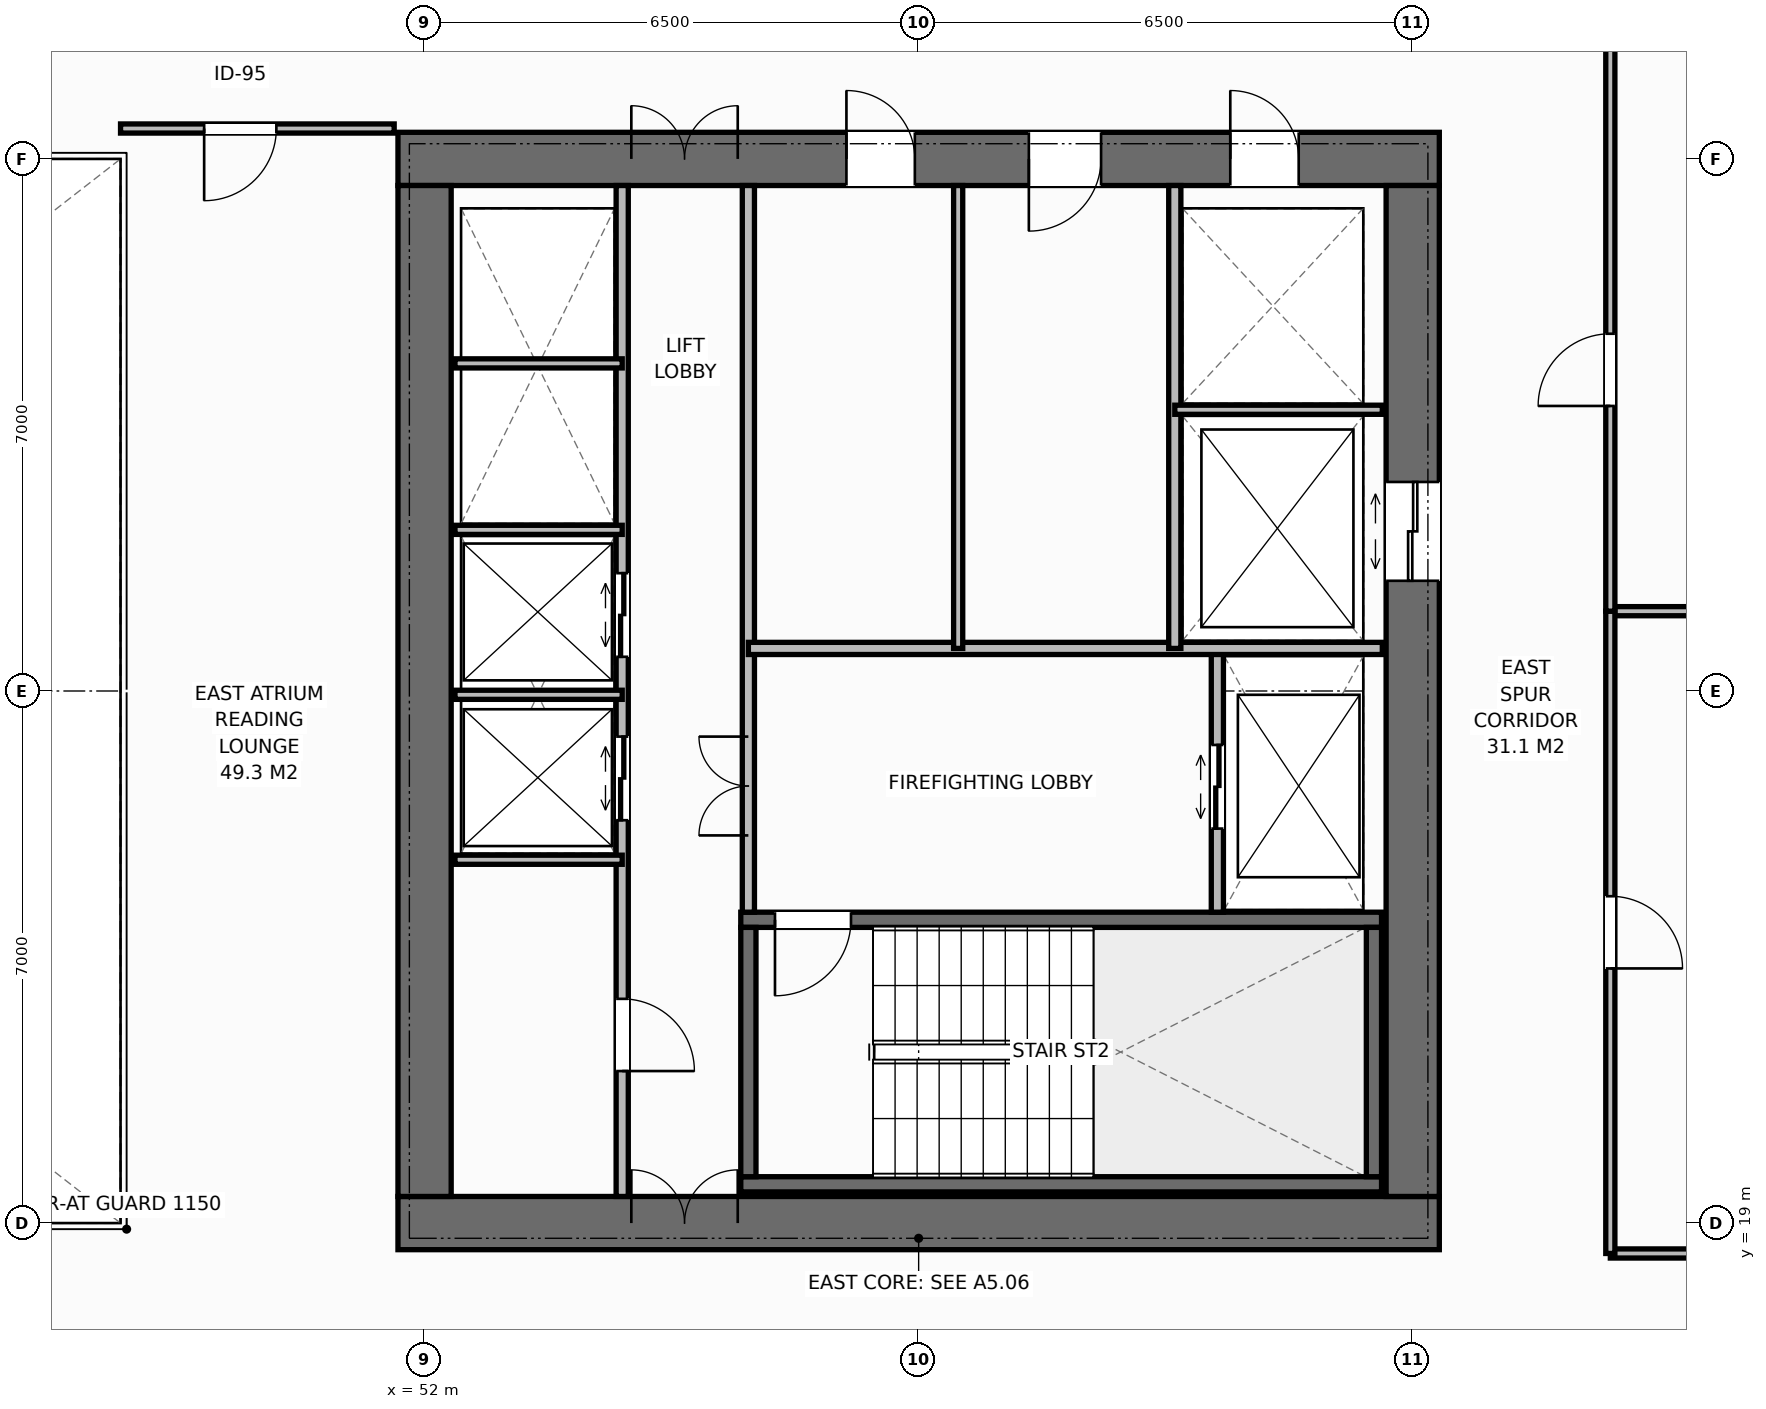
"""IFC4 building model, lengths in metres.
Left out: names, types, materials, properties, quantities, classifications, styles, units other than length and angle.
Written with IfcOpenShell. Run it as: python <this file> out.ifc"""

import sys

from ifc_helpers import new_model, si_unit, direction, frame, frame_2d, origin, place, context, subcontext, project, spatial, rectangle, extrude, element, fill, save


model = new_model("IFC4")
c1 = context("Model", 3, precision=1e-05, world=origin(), true_north=direction((0.0, 1.0)))
c2 = subcontext(c1, "Body", "Model", "MODEL_VIEW")
j1 = project(units=[si_unit("LENGTHUNIT", "METRE"), si_unit("PLANEANGLEUNIT", "RADIAN")], contexts=[c1])
p1 = place(None, origin())
s1 = spatial("IfcSite", under=j1, at=p1, CompositionType="ELEMENT")
p2 = place(p1, origin())
s2 = spatial("IfcBuilding", under=s1, at=p2, CompositionType="ELEMENT")
p3 = place(p2, frame((0.0, 0.0, 131.6)))
s3 = spatial("IfcBuildingStorey", under=s2, at=p3, CompositionType="ELEMENT", Elevation=131.6)
p4 = place(p3, frame((51.65, 19.0, 0.0), z_axis=(0.0, 0.0, 1.0), x_axis=(1.0, 0.0, 0.0)))
e1 = element("IfcWall", 1, at=p4, inside=s3, PredefinedType="SHEAR", context=c2, shape_type="SweptSolid", body=[
    extrude(rectangle(XDim=13.7, YDim=0.7, at=frame_2d((6.85, 0.0))), origin(), (0.0, 0.0, 1.0), 3.8),
])
p5 = place(p4, frame((3.07, 0.0, 0.0)))
e2 = element("IfcOpeningElement", 2, at=p5, cuts=e1, PredefinedType="OPENING", context=c2, shape_type="SweptSolid", body=[
    extrude(rectangle(XDim=1.4, YDim=2.2, at=frame_2d((0.7, 1.1))), frame((0.0, 0.36, 0.0), z_axis=(0.0, -1.0, 0.0), x_axis=(1.0, 0.0, 0.0)), (0.0, 0.0, 1.0), 0.72),
])
p6 = place(p3, frame((51.65, 33.0, 0.0), z_axis=(0.0, 0.0, 1.0), x_axis=(1.0, 0.0, 0.0)))
e3 = element("IfcWall", 3, at=p6, inside=s3, PredefinedType="SHEAR", context=c2, shape_type="SweptSolid", body=[
    extrude(rectangle(XDim=13.7, YDim=0.7, at=frame_2d((6.85, 0.0))), origin(), (0.0, 0.0, 1.0), 3.8),
])
p7 = place(p6, frame((3.07, 0.0, 0.0)))
e4 = element("IfcOpeningElement", 4, at=p7, cuts=e3, PredefinedType="OPENING", context=c2, shape_type="SweptSolid", body=[
    extrude(rectangle(XDim=1.4, YDim=2.2, at=frame_2d((0.7, 1.1))), frame((0.0, 0.36, 0.0), z_axis=(0.0, -1.0, 0.0), x_axis=(1.0, 0.0, 0.0)), (0.0, 0.0, 1.0), 0.72),
])
p8 = place(p6, frame((10.95, 0.0, 0.0)))
e5 = element("IfcOpeningElement", 5, at=p8, cuts=e3, PredefinedType="OPENING", context=c2, shape_type="SweptSolid", body=[
    extrude(rectangle(XDim=0.9, YDim=2.15, at=frame_2d((0.45, 1.075))), frame((0.0, 0.36, 0.0), z_axis=(0.0, -1.0, 0.0), x_axis=(1.0, 0.0, 0.0)), (0.0, 0.0, 1.0), 0.72),
])
p9 = place(p6, frame((5.9, 0.0, 0.0)))
e6 = element("IfcOpeningElement", 6, at=p9, cuts=e3, PredefinedType="OPENING", context=c2, shape_type="SweptSolid", body=[
    extrude(rectangle(XDim=0.9, YDim=2.15, at=frame_2d((0.45, 1.075))), frame((0.0, 0.36, 0.0), z_axis=(0.0, -1.0, 0.0), x_axis=(1.0, 0.0, 0.0)), (0.0, 0.0, 1.0), 0.72),
])
p10 = place(p6, frame((8.3, 0.0, 0.0)))
e7 = element("IfcOpeningElement", 7, at=p10, cuts=e3, PredefinedType="OPENING", context=c2, shape_type="SweptSolid", body=[
    extrude(rectangle(XDim=0.95, YDim=2.15, at=frame_2d((0.475, 1.075))), frame((0.0, 0.36, 0.0), z_axis=(0.0, -1.0, 0.0), x_axis=(1.0, 0.0, 0.0)), (0.0, 0.0, 1.0), 0.72),
])
p11 = place(p3, frame((52.0, 19.35, 0.0), z_axis=(0.0, 0.0, 1.0), x_axis=(0.0, 1.0, 0.0)))
e8 = element("IfcWall", 8, at=p11, inside=s3, PredefinedType="SHEAR", context=c2, shape_type="SweptSolid", body=[
    extrude(rectangle(XDim=13.3, YDim=0.7, at=frame_2d((6.65, 0.0))), origin(), (0.0, 0.0, 1.0), 3.8),
])
p12 = place(p3, frame((65.0, 19.35, 0.0), z_axis=(0.0, 0.0, 1.0), x_axis=(0.0, 1.0, 0.0)))
e9 = element("IfcWall", 9, at=p12, inside=s3, PredefinedType="SHEAR", context=c2, shape_type="SweptSolid", body=[
    extrude(rectangle(XDim=13.3, YDim=0.7, at=frame_2d((6.65, 0.0))), origin(), (0.0, 0.0, 1.0), 3.8),
])
p13 = place(p12, frame((8.1, 0.0, 0.0)))
e10 = element("IfcOpeningElement", 10, at=p13, cuts=e9, PredefinedType="OPENING", context=c2, shape_type="SweptSolid", body=[
    extrude(rectangle(XDim=1.3, YDim=2.2, at=frame_2d((0.65, 1.1))), frame((0.0, 0.36, 0.0), z_axis=(0.0, -1.0, 0.0), x_axis=(1.0, 0.0, 0.0)), (0.0, 0.0, 1.0), 0.72),
])
p14 = place(p3, frame((56.16, 19.51, 0.0), z_axis=(0.0, 0.0, 1.0), x_axis=(1.0, 0.0, 0.0)))
e11 = element("IfcWall", 11, at=p14, inside=s3, PredefinedType="SHEAR", context=c2, shape_type="SweptSolid", body=[
    extrude(rectangle(XDim=8.43, YDim=0.2, at=frame_2d((4.215, 0.0))), origin(), (0.0, 0.0, 1.0), 3.8),
])
p15 = place(p3, frame((56.16, 22.99, 0.0), z_axis=(0.0, 0.0, 1.0), x_axis=(1.0, 0.0, 0.0)))
e12 = element("IfcWall", 12, at=p15, inside=s3, PredefinedType="SHEAR", context=c2, shape_type="SweptSolid", body=[
    extrude(rectangle(XDim=8.43, YDim=0.2, at=frame_2d((4.215, 0.0))), origin(), (0.0, 0.0, 1.0), 3.8),
])
p16 = place(p15, frame((0.45, 0.0, 0.0)))
e13 = element("IfcOpeningElement", 13, at=p16, cuts=e12, PredefinedType="OPENING", context=c2, shape_type="SweptSolid", body=[
    extrude(rectangle(XDim=1.0, YDim=2.15, at=frame_2d((0.5, 1.075))), frame((0.0, 0.11, 0.0), z_axis=(0.0, -1.0, 0.0), x_axis=(1.0, 0.0, 0.0)), (0.0, 0.0, 1.0), 0.22),
])
for number, where, z_axis, x_axis in (
    (14, (56.26, 19.61, 0.0), (0.0, 0.0, 1.0), (0.0, 1.0, 0.0)),
    (15, (64.49, 19.61, 0.0), (0.0, 0.0, 1.0), (0.0, 1.0, 0.0)),
):
    element("IfcWall", number, at=place(p3, frame(where, z_axis=z_axis, x_axis=x_axis)), inside=s3, PredefinedType="SHEAR", context=c2, shape_type="SweptSolid", body=[
        extrude(rectangle(XDim=3.28, YDim=0.2, at=frame_2d((1.64, 0.0))), origin(), (0.0, 0.0, 1.0), 3.8),
    ])
p17 = place(p3, frame((54.6, 19.35, 0.0), z_axis=(0.0, 0.0, 1.0), x_axis=(0.0, 1.0, 0.0)))
e16 = element("IfcWall", 16, at=p17, inside=s3, PredefinedType="STANDARD", context=c2, shape_type="SweptSolid", body=[
    extrude(rectangle(XDim=13.3, YDim=0.16, at=frame_2d((6.65, 0.0))), origin(), (0.0, 0.0, 1.0), 3.565),
])
p18 = place(p17, frame((1.65, 0.0, 0.0)))
e17 = element("IfcOpeningElement", 17, at=p18, cuts=e16, PredefinedType="OPENING", context=c2, shape_type="SweptSolid", body=[
    extrude(rectangle(XDim=0.95, YDim=2.15, at=frame_2d((0.475, 1.075))), frame((0.0, 0.09, 0.0), z_axis=(0.0, -1.0, 0.0), x_axis=(1.0, 0.0, 0.0)), (0.0, 0.0, 1.0), 0.18),
])
p19 = place(p17, frame((4.95, 0.0, 0.0)))
e18 = element("IfcOpeningElement", 18, at=p19, cuts=e16, PredefinedType="OPENING", context=c2, shape_type="SweptSolid", body=[
    extrude(rectangle(XDim=1.1, YDim=2.2, at=frame_2d((0.55, 1.1))), frame((0.0, 0.09, 0.0), z_axis=(0.0, -1.0, 0.0), x_axis=(1.0, 0.0, 0.0)), (0.0, 0.0, 1.0), 0.18),
])
p20 = place(p17, frame((7.1, 0.0, 0.0)))
e19 = element("IfcOpeningElement", 19, at=p20, cuts=e16, PredefinedType="OPENING", context=c2, shape_type="SweptSolid", body=[
    extrude(rectangle(XDim=1.1, YDim=2.2, at=frame_2d((0.55, 1.1))), frame((0.0, 0.09, 0.0), z_axis=(0.0, -1.0, 0.0), x_axis=(1.0, 0.0, 0.0)), (0.0, 0.0, 1.0), 0.18),
])
p21 = place(p3, frame((56.26, 23.09, 0.0), z_axis=(0.0, 0.0, 1.0), x_axis=(0.0, 1.0, 0.0)))
e20 = element("IfcWall", 20, at=p21, inside=s3, PredefinedType="STANDARD", context=c2, shape_type="SweptSolid", body=[
    extrude(rectangle(XDim=9.56, YDim=0.16, at=frame_2d((4.78, 0.0))), origin(), (0.0, 0.0, 1.0), 3.565),
])
p22 = place(p21, frame((1.01, 0.0, 0.0)))
e21 = element("IfcOpeningElement", 21, at=p22, cuts=e20, PredefinedType="OPENING", context=c2, shape_type="SweptSolid", body=[
    extrude(rectangle(XDim=1.3, YDim=2.2, at=frame_2d((0.65, 1.1))), frame((0.0, 0.09, 0.0), z_axis=(0.0, -1.0, 0.0), x_axis=(1.0, 0.0, 0.0)), (0.0, 0.0, 1.0), 0.18),
])
for number, where, z_axis, x_axis in (
    (22, (52.4, 23.78, 0.0), (0.0, 0.0, 1.0), (1.0, 0.0, 0.0)),
    (23, (52.4, 25.95, 0.0), (0.0, 0.0, 1.0), (1.0, 0.0, 0.0)),
    (24, (52.4, 28.12, 0.0), (0.0, 0.0, 1.0), (1.0, 0.0, 0.0)),
    (25, (52.4, 30.31, 0.0), (0.0, 0.0, 1.0), (1.0, 0.0, 0.0)),
):
    element("IfcWall", number, at=place(p3, frame(where, z_axis=z_axis, x_axis=x_axis)), inside=s3, PredefinedType="PARTITIONING", context=c2, shape_type="SweptSolid", body=[
        extrude(rectangle(XDim=2.2, YDim=0.12, at=frame_2d((1.1, 0.0))), origin(), (0.0, 0.0, 1.0), 3.565),
    ])
p23 = place(p3, frame((62.43, 23.09, 0.0), z_axis=(0.0, 0.0, 1.0), x_axis=(0.0, 1.0, 0.0)))
e26 = element("IfcWall", 26, at=p23, inside=s3, PredefinedType="STANDARD", context=c2, shape_type="SweptSolid", body=[
    extrude(rectangle(XDim=3.47, YDim=0.16, at=frame_2d((1.735, 0.0))), origin(), (0.0, 0.0, 1.0), 3.565),
])
p24 = place(p23, frame((1.1, 0.0, 0.0)))
e27 = element("IfcOpeningElement", 27, at=p24, cuts=e26, PredefinedType="OPENING", context=c2, shape_type="SweptSolid", body=[
    extrude(rectangle(XDim=1.1, YDim=2.2, at=frame_2d((0.55, 1.1))), frame((0.0, 0.09, 0.0), z_axis=(0.0, -1.0, 0.0), x_axis=(1.0, 0.0, 0.0)), (0.0, 0.0, 1.0), 0.18),
])
p25 = place(p3, frame((56.26, 26.56, 0.0), z_axis=(0.0, 0.0, 1.0), x_axis=(1.0, 0.0, 0.0)))
e28 = element("IfcWall", 28, at=p25, inside=s3, PredefinedType="STANDARD", context=c2, shape_type="SweptSolid", body=[
    extrude(rectangle(XDim=8.34, YDim=0.16, at=frame_2d((4.17, 0.0))), origin(), (0.0, 0.0, 1.0), 3.565),
])
p26 = place(p3, frame((61.87, 26.56, 0.0), z_axis=(0.0, 0.0, 1.0), x_axis=(0.0, 1.0, 0.0)))
e29 = element("IfcWall", 29, at=p26, inside=s3, PredefinedType="STANDARD", context=c2, shape_type="SweptSolid", body=[
    extrude(rectangle(XDim=6.09, YDim=0.16, at=frame_2d((3.045, 0.0))), origin(), (0.0, 0.0, 1.0), 3.565),
])
p27 = place(p3, frame((61.87, 29.7, 0.0), z_axis=(0.0, 0.0, 1.0), x_axis=(1.0, 0.0, 0.0)))
e30 = element("IfcWall", 30, at=p27, inside=s3, PredefinedType="PARTITIONING", context=c2, shape_type="SweptSolid", body=[
    extrude(rectangle(XDim=2.73, YDim=0.12, at=frame_2d((1.365, 0.0))), origin(), (0.0, 0.0, 1.0), 3.565),
])
p28 = place(p3, frame((59.02, 26.56, 0.0), z_axis=(0.0, 0.0, 1.0), x_axis=(0.0, 1.0, 0.0)))
e31 = element("IfcWall", 31, at=p28, inside=s3, PredefinedType="PARTITIONING", context=c2, shape_type="SweptSolid", body=[
    extrude(rectangle(XDim=6.09, YDim=0.12, at=frame_2d((3.045, 0.0))), origin(), (0.0, 0.0, 1.0), 3.565),
])
p29 = place(p3, frame((48.0, 33.4, 0.0), z_axis=(0.0, 0.0, 1.0), x_axis=(1.0, 0.0, 0.0)))
e32 = element("IfcWall", 32, at=p29, inside=s3, PredefinedType="PARTITIONING", context=c2, shape_type="SweptSolid", body=[
    extrude(rectangle(XDim=3.6, YDim=0.12, at=frame_2d((1.8, 0.0))), origin(), (0.0, 0.0, 1.0), 3.565),
])
p30 = place(p29, frame((1.1, 0.0, 0.0)))
e33 = element("IfcOpeningElement", 33, at=p30, cuts=e32, PredefinedType="OPENING", context=c2, shape_type="SweptSolid", body=[
    extrude(rectangle(XDim=0.95, YDim=2.15, at=frame_2d((0.475, 1.075))), frame((0.0, 0.07, 0.0), z_axis=(0.0, -1.0, 0.0), x_axis=(1.0, 0.0, 0.0)), (0.0, 0.0, 1.0), 0.14),
])
for number, where, z_axis, x_axis in (
    (34, (67.6, 18.6, 0.0), (0.0, 0.0, 1.0), (1.0, 0.0, 0.0)),
    (35, (67.6, 27.05, 0.0), (0.0, 0.0, 1.0), (1.0, 0.0, 0.0)),
):
    element("IfcWall", number, at=place(p3, frame(where, z_axis=z_axis, x_axis=x_axis)), inside=s3, PredefinedType="PARTITIONING", context=c2, shape_type="SweptSolid", body=[
        extrude(rectangle(XDim=8.58, YDim=0.12, at=frame_2d((4.29, 0.0))), origin(), (0.0, 0.0, 1.0), 3.565),
    ])
p31 = place(p3, frame((67.6, 18.6, 0.0), z_axis=(0.0, 0.0, 1.0), x_axis=(0.0, 1.0, 0.0)))
e36 = element("IfcWall", 36, at=p31, inside=s3, PredefinedType="PARTITIONING", context=c2, shape_type="SweptSolid", body=[
    extrude(rectangle(XDim=8.45, YDim=0.12, at=frame_2d((4.225, 0.0))), origin(), (0.0, 0.0, 1.0), 3.565),
])
p32 = place(p31, frame((3.75, 0.0, 0.0)))
e37 = element("IfcOpeningElement", 37, at=p32, cuts=e36, PredefinedType="OPENING", context=c2, shape_type="SweptSolid", body=[
    extrude(rectangle(XDim=0.95, YDim=2.15, at=frame_2d((0.475, 1.075))), frame((0.0, 0.07, 0.0), z_axis=(0.0, -1.0, 0.0), x_axis=(1.0, 0.0, 0.0)), (0.0, 0.0, 1.0), 0.14),
])
p33 = place(p3, frame((67.6, 27.05, 0.0), z_axis=(0.0, 0.0, 1.0), x_axis=(0.0, 1.0, 0.0)))
e38 = element("IfcWall", 38, at=p33, inside=s3, PredefinedType="PARTITIONING", context=c2, shape_type="SweptSolid", body=[
    extrude(rectangle(XDim=8.45, YDim=0.12, at=frame_2d((4.225, 0.0))), origin(), (0.0, 0.0, 1.0), 3.565),
])
p34 = place(p33, frame((2.7, 0.0, 0.0)))
e39 = element("IfcOpeningElement", 39, at=p34, cuts=e38, PredefinedType="OPENING", context=c2, shape_type="SweptSolid", body=[
    extrude(rectangle(XDim=0.95, YDim=2.15, at=frame_2d((0.475, 1.075))), frame((0.0, 0.07, 0.0), z_axis=(0.0, -1.0, 0.0), x_axis=(1.0, 0.0, 0.0)), (0.0, 0.0, 1.0), 0.14),
])
p35 = place(p5, origin())
e40 = element("IfcDoor", 40, at=p35, inside=s3, OperationType="DOUBLE_DOOR_SINGLE_SWING", PredefinedType="DOOR", context=c2, shape_type="SweptSolid", body=[
    extrude(rectangle(XDim=1.4, YDim=2.2, at=frame_2d((0.7, 1.1))), frame((0.0, 0.125, 0.0), z_axis=(0.0, -1.0, 0.0), x_axis=(1.0, 0.0, 0.0)), (0.0, 0.0, 1.0), 0.05),
])
fill(e2, e40)
p36 = place(p7, origin())
e41 = element("IfcDoor", 41, at=p36, inside=s3, OperationType="DOUBLE_DOOR_SINGLE_SWING", PredefinedType="DOOR", context=c2, shape_type="SweptSolid", body=[
    extrude(rectangle(XDim=1.4, YDim=2.2, at=frame_2d((0.7, 1.1))), frame((0.0, -0.075, 0.0), z_axis=(0.0, -1.0, 0.0), x_axis=(1.0, 0.0, 0.0)), (0.0, 0.0, 1.0), 0.05),
])
fill(e4, e41)
p37 = place(p18, origin())
e42 = element("IfcDoor", 42, at=p37, inside=s3, OperationType="SINGLE_SWING_RIGHT", PredefinedType="DOOR", context=c2, shape_type="SweptSolid", body=[
    extrude(rectangle(XDim=0.95, YDim=2.15, at=frame_2d((0.475, 1.075))), frame((0.0, 0.025, 0.0), z_axis=(0.0, -1.0, 0.0), x_axis=(1.0, 0.0, 0.0)), (0.0, 0.0, 1.0), 0.05),
])
fill(e17, e42)
p38 = place(p19, origin())
e43 = element("IfcDoor", 43, at=p38, inside=s3, OperationType="DOUBLE_DOOR_SLIDING", PredefinedType="DOOR", context=c2, shape_type="SweptSolid", body=[
    extrude(rectangle(XDim=1.1, YDim=2.2, at=frame_2d((0.55, 1.1))), frame((0.0, 0.025, 0.0), z_axis=(0.0, -1.0, 0.0), x_axis=(1.0, 0.0, 0.0)), (0.0, 0.0, 1.0), 0.05),
])
fill(e18, e43)
p39 = place(p20, origin())
e44 = element("IfcDoor", 44, at=p39, inside=s3, OperationType="DOUBLE_DOOR_SLIDING", PredefinedType="DOOR", context=c2, shape_type="SweptSolid", body=[
    extrude(rectangle(XDim=1.1, YDim=2.2, at=frame_2d((0.55, 1.1))), frame((0.0, 0.025, 0.0), z_axis=(0.0, -1.0, 0.0), x_axis=(1.0, 0.0, 0.0)), (0.0, 0.0, 1.0), 0.05),
])
fill(e19, e44)
p40 = place(p16, origin())
e45 = element("IfcDoor", 45, at=p40, inside=s3, OperationType="SINGLE_SWING_RIGHT", PredefinedType="DOOR", context=c2, shape_type="SweptSolid", body=[
    extrude(rectangle(XDim=1.0, YDim=2.15, at=frame_2d((0.5, 1.075))), frame((0.0, 0.025, 0.0), z_axis=(0.0, -1.0, 0.0), x_axis=(1.0, 0.0, 0.0)), (0.0, 0.0, 1.0), 0.05),
])
fill(e13, e45)
p41 = place(p24, origin())
e46 = element("IfcDoor", 46, at=p41, inside=s3, OperationType="DOUBLE_DOOR_SLIDING", PredefinedType="DOOR", context=c2, shape_type="SweptSolid", body=[
    extrude(rectangle(XDim=1.1, YDim=2.2, at=frame_2d((0.55, 1.1))), frame((0.0, 0.025, 0.0), z_axis=(0.0, -1.0, 0.0), x_axis=(1.0, 0.0, 0.0)), (0.0, 0.0, 1.0), 0.05),
])
fill(e27, e46)
p42 = place(p22, origin())
e47 = element("IfcDoor", 47, at=p42, inside=s3, OperationType="DOUBLE_DOOR_SINGLE_SWING", PredefinedType="DOOR", context=c2, shape_type="SweptSolid", body=[
    extrude(rectangle(XDim=1.3, YDim=2.2, at=frame_2d((0.65, 1.1))), frame((0.0, 0.025, 0.0), z_axis=(0.0, -1.0, 0.0), x_axis=(1.0, 0.0, 0.0)), (0.0, 0.0, 1.0), 0.05),
])
fill(e21, e47)
p43 = place(p13, origin())
e48 = element("IfcDoor", 48, at=p43, inside=s3, OperationType="DOUBLE_DOOR_SLIDING", PredefinedType="DOOR", context=c2, shape_type="SweptSolid", body=[
    extrude(rectangle(XDim=1.3, YDim=2.2, at=frame_2d((0.65, 1.1))), frame((0.0, 0.025, 0.0), z_axis=(0.0, -1.0, 0.0), x_axis=(1.0, 0.0, 0.0)), (0.0, 0.0, 1.0), 0.05),
])
fill(e10, e48)
p44 = place(p8, origin())
e49 = element("IfcDoor", 49, at=p44, inside=s3, OperationType="SINGLE_SWING_LEFT", PredefinedType="DOOR", context=c2, shape_type="SweptSolid", body=[
    extrude(rectangle(XDim=0.9, YDim=2.15, at=frame_2d((0.45, 1.075))), frame((0.0, -0.075, 0.0), z_axis=(0.0, -1.0, 0.0), x_axis=(1.0, 0.0, 0.0)), (0.0, 0.0, 1.0), 0.05),
])
fill(e5, e49)
p45 = place(p9, origin())
e50 = element("IfcDoor", 50, at=p45, inside=s3, OperationType="SINGLE_SWING_LEFT", PredefinedType="DOOR", context=c2, shape_type="SweptSolid", body=[
    extrude(rectangle(XDim=0.9, YDim=2.15, at=frame_2d((0.45, 1.075))), frame((0.0, -0.075, 0.0), z_axis=(0.0, -1.0, 0.0), x_axis=(1.0, 0.0, 0.0)), (0.0, 0.0, 1.0), 0.05),
])
fill(e6, e50)
p46 = place(p10, origin())
e51 = element("IfcDoor", 51, at=p46, inside=s3, OperationType="SINGLE_SWING_RIGHT", PredefinedType="DOOR", context=c2, shape_type="SweptSolid", body=[
    extrude(rectangle(XDim=0.95, YDim=2.15, at=frame_2d((0.475, 1.075))), frame((0.0, -0.075, 0.0), z_axis=(0.0, -1.0, 0.0), x_axis=(1.0, 0.0, 0.0)), (0.0, 0.0, 1.0), 0.05),
])
fill(e7, e51)
p47 = place(p30, origin())
e52 = element("IfcDoor", 52, at=p47, inside=s3, OperationType="SINGLE_SWING_RIGHT", PredefinedType="DOOR", context=c2, shape_type="SweptSolid", body=[
    extrude(rectangle(XDim=0.95, YDim=2.15, at=frame_2d((0.475, 1.075))), frame((0.0, 0.025, 0.0), z_axis=(0.0, -1.0, 0.0), x_axis=(1.0, 0.0, 0.0)), (0.0, 0.0, 1.0), 0.05),
])
fill(e33, e52)
p48 = place(p32, origin())
e53 = element("IfcDoor", 53, at=p48, inside=s3, OperationType="SINGLE_SWING_RIGHT", PredefinedType="DOOR", context=c2, shape_type="SweptSolid", body=[
    extrude(rectangle(XDim=0.95, YDim=2.15, at=frame_2d((0.475, 1.075))), frame((0.0, 0.025, 0.0), z_axis=(0.0, -1.0, 0.0), x_axis=(1.0, 0.0, 0.0)), (0.0, 0.0, 1.0), 0.05),
])
fill(e37, e53)
p49 = place(p34, origin())
e54 = element("IfcDoor", 54, at=p49, inside=s3, OperationType="SINGLE_SWING_LEFT", PredefinedType="DOOR", context=c2, shape_type="SweptSolid", body=[
    extrude(rectangle(XDim=0.95, YDim=2.15, at=frame_2d((0.475, 1.075))), frame((0.0, 0.025, 0.0), z_axis=(0.0, -1.0, 0.0), x_axis=(1.0, 0.0, 0.0)), (0.0, 0.0, 1.0), 0.05),
])
fill(e39, e54)
save(model, sys.argv[1])
